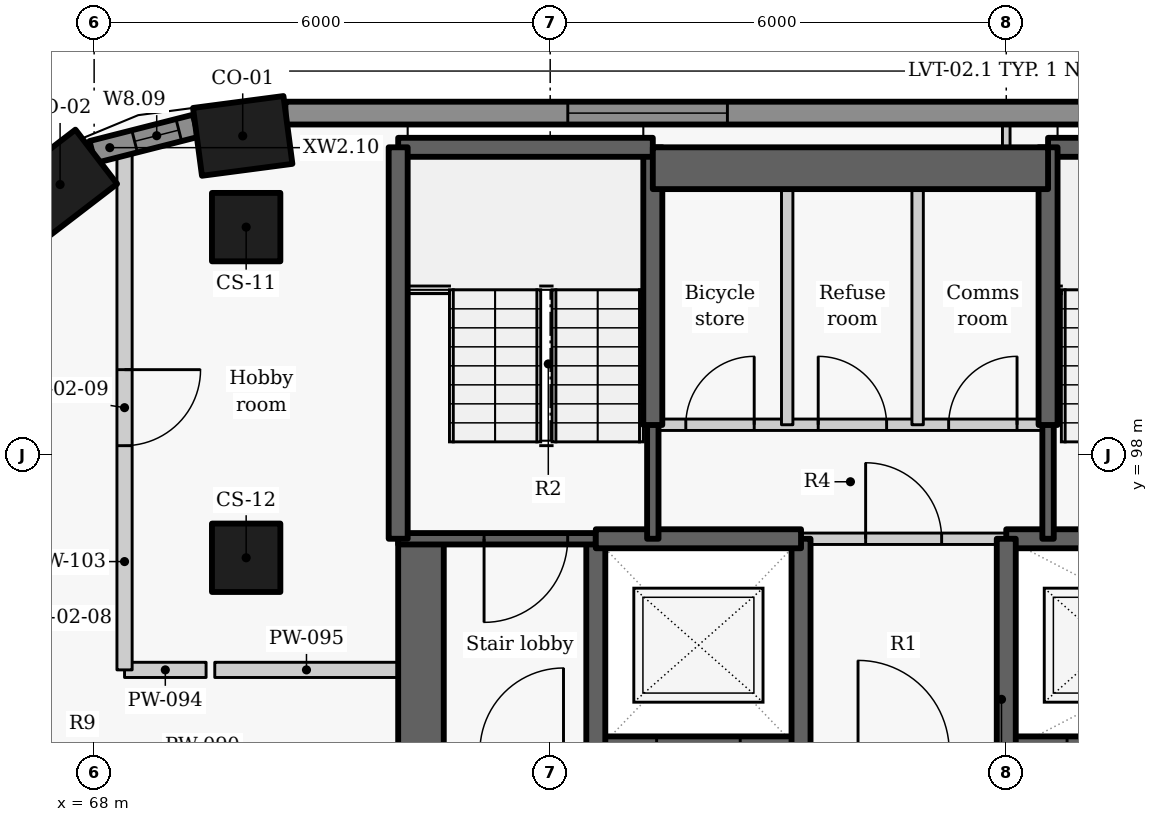
"""IFC4 building model, lengths in metres.
Left out: names, types, materials, properties, quantities, classifications, styles, units other than length and angle.
Written with IfcOpenShell. Run it as: python <this file> out.ifc"""

import sys

from ifc_helpers import new_model, si_unit, direction, frame, frame_2d, origin, origin_2d, place, context, subcontext, project, spatial, rectangle, extrude, element, fill, save


model = new_model("IFC4")
c1 = context("Model", 3, precision=1e-05, world=origin(), true_north=direction((0.0, 1.0)))
c2 = subcontext(c1, "Body", "Model", "MODEL_VIEW")
j1 = project(units=[si_unit("LENGTHUNIT", "METRE"), si_unit("PLANEANGLEUNIT", "RADIAN")], contexts=[c1])
p1 = place(None, origin())
s1 = spatial("IfcSite", under=j1, at=p1, CompositionType="ELEMENT")
p2 = place(p1, origin())
s2 = spatial("IfcBuilding", under=s1, at=p2, CompositionType="ELEMENT")
p3 = place(p2, frame((0.0, 0.0, 176.7)))
s3 = spatial("IfcBuildingStorey", under=s2, at=p3, CompositionType="ELEMENT", Elevation=176.7)
for number, where, z_axis, x_axis in (
    (1, (69.955, 102.2, 0.0), (0.0, 0.0, 1.0), (-0.991, -0.131, 0.0)),
    (2, (67.552, 101.56, 0.0), (0.0, 0.0, 1.0), (-0.793, -0.609, 0.0)),
):
    element("IfcColumn", number, at=place(p3, frame(where, z_axis=z_axis, x_axis=x_axis)), inside=s3, PredefinedType="COLUMN", context=c2, shape_type="SweptSolid", body=[
        extrude(rectangle(XDim=1.2, YDim=0.9, at=origin_2d()), origin(), (0.0, 0.0, 1.0), 3.3),
    ])
for number, where, z_axis, x_axis in (
    (3, (70.0, 101.0, 0.0), (0.0, 0.0, 1.0), (0.0, -1.0, 0.0)),
    (4, (70.0, 96.65, 0.0), (0.0, 0.0, 1.0), (0.0, -1.0, 0.0)),
):
    element("IfcColumn", number, at=place(p3, frame(where, z_axis=z_axis, x_axis=x_axis)), inside=s3, PredefinedType="COLUMN", context=c2, shape_type="SweptSolid", body=[
        extrude(rectangle(XDim=0.9, YDim=0.9, at=origin_2d()), origin(), (0.0, 0.0, 1.0), 3.3),
    ])
p4 = place(p3, frame((89.449, 102.5, 0.0), z_axis=(0.0, 0.0, 1.0), x_axis=(-1.0, 0.0, 0.0)))
e5 = element("IfcWall", 5, at=p4, inside=s3, PredefinedType="SOLIDWALL", context=c2, shape_type="SweptSolid", body=[
    extrude(rectangle(XDim=18.933, YDim=0.3, at=frame_2d((9.466, 0.0))), origin(), (0.0, 0.0, 1.0), 2.425),
])
p5 = place(p4, frame((3.687, 0.0, 0.9)))
e6 = element("IfcOpeningElement", 6, at=p5, cuts=e5, PredefinedType="OPENING", context=c2, shape_type="SweptSolid", body=[
    extrude(rectangle(XDim=2.1, YDim=1.1, at=frame_2d((1.05, 0.55))), frame((0.0, 0.16, 0.0), z_axis=(0.0, -1.0, 0.0), x_axis=(1.0, 0.0, 0.0)), (0.0, 0.0, 1.0), 0.32),
])
p6 = place(p4, frame((13.118, 0.0, 0.9)))
e7 = element("IfcOpeningElement", 7, at=p6, cuts=e5, PredefinedType="OPENING", context=c2, shape_type="SweptSolid", body=[
    extrude(rectangle(XDim=2.1, YDim=1.1, at=frame_2d((1.05, 0.55))), frame((0.0, 0.16, 0.0), z_axis=(0.0, -1.0, 0.0), x_axis=(1.0, 0.0, 0.0)), (0.0, 0.0, 1.0), 0.32),
])
p7 = place(p3, frame((69.336, 102.333, 0.0), z_axis=(0.0, 0.0, 1.0), x_axis=(-0.969037396898, -0.246914000036, 0.0)))
e8 = element("IfcWall", 8, at=p7, inside=s3, PredefinedType="SOLIDWALL", context=c2, shape_type="SweptSolid", body=[
    extrude(rectangle(XDim=1.403, YDim=0.3, at=frame_2d((0.702, 0.0))), origin(), (0.0, 0.0, 1.0), 2.425),
])
p8 = place(p7, frame((0.229, 0.0, 0.9)))
e9 = element("IfcOpeningElement", 9, at=p8, cuts=e8, PredefinedType="OPENING", context=c2, shape_type="SweptSolid", body=[
    extrude(rectangle(XDim=0.6, YDim=1.1, at=frame_2d((0.3, 0.55))), frame((0.0, 0.16, 0.0), z_axis=(0.0, -1.0, 0.0), x_axis=(1.0, 0.0, 0.0)), (0.0, 0.0, 1.0), 0.32),
])
p9 = place(p3, frame((72.3, 87.8, -0.41), z_axis=(0.0, 0.0, 1.0), x_axis=(0.0, 1.0, 0.0)))
e10 = element("IfcWall", 10, at=p9, inside=s3, PredefinedType="SHEAR", context=c2, shape_type="SweptSolid", body=[
    extrude(rectangle(XDim=9.1, YDim=0.6, at=frame_2d((4.55, 0.0))), origin(), (0.0, 0.0, 1.0), 3.435),
])
p10 = place(p9, frame((3.852, 0.0, 0.41)))
e11 = element("IfcOpeningElement", 11, at=p10, cuts=e10, PredefinedType="OPENING", context=c2, shape_type="SweptSolid", body=[
    extrude(rectangle(XDim=1.5, YDim=2.1, at=frame_2d((0.75, 1.05))), frame((0.0, 0.31, 0.0), z_axis=(0.0, -1.0, 0.0), x_axis=(1.0, 0.0, 0.0)), (0.0, 0.0, 1.0), 0.62),
])
p11 = place(p3, frame((74.597, 94.1, -0.41), z_axis=(0.0, 0.0, 1.0), x_axis=(1.0, 0.0, 0.0)))
e12 = element("IfcWall", 12, at=p11, inside=s3, PredefinedType="SHEAR", context=c2, shape_type="SweptSolid", body=[
    extrude(rectangle(XDim=2.706, YDim=0.4, at=frame_2d((1.353, 0.0))), origin(), (0.0, 0.0, 1.0), 3.435),
])
p12 = place(p11, frame((0.803, 0.0, 0.41)))
e13 = element("IfcOpeningElement", 13, at=p12, cuts=e12, PredefinedType="OPENING", context=c2, shape_type="SweptSolid", body=[
    extrude(rectangle(XDim=1.1, YDim=2.1, at=frame_2d((0.55, 1.05))), frame((0.0, 0.21, 0.0), z_axis=(0.0, -1.0, 0.0), x_axis=(1.0, 0.0, 0.0)), (0.0, 0.0, 1.0), 0.42),
])
p13 = place(p3, frame((79.997, 94.1, -0.41), z_axis=(0.0, 0.0, 1.0), x_axis=(1.0, 0.0, 0.0)))
e14 = element("IfcWall", 14, at=p13, inside=s3, PredefinedType="SHEAR", context=c2, shape_type="SweptSolid", body=[
    extrude(rectangle(XDim=5.406, YDim=0.4, at=frame_2d((2.703, 0.0))), origin(), (0.0, 0.0, 1.0), 3.435),
])
p14 = place(p13, frame((0.803, 0.0, 0.41)))
e15 = element("IfcOpeningElement", 15, at=p14, cuts=e14, PredefinedType="OPENING", context=c2, shape_type="SweptSolid", body=[
    extrude(rectangle(XDim=1.1, YDim=2.1, at=frame_2d((0.55, 1.05))), frame((0.0, 0.21, 0.0), z_axis=(0.0, -1.0, 0.0), x_axis=(1.0, 0.0, 0.0)), (0.0, 0.0, 1.0), 0.42),
])
p15 = place(p3, frame((74.6, 94.1, -0.41), z_axis=(0.0, 0.0, 1.0), x_axis=(0.0, 1.0, 0.0)))
e16 = element("IfcWall", 16, at=p15, inside=s3, PredefinedType="SHEAR", context=c2, shape_type="SweptSolid", body=[
    extrude(rectangle(XDim=2.8, YDim=0.25, at=frame_2d((1.4, 0.0))), origin(), (0.0, 0.0, 1.0), 3.435),
])
p16 = place(p3, frame((74.6, 96.9, -0.41), z_axis=(0.0, 0.0, 1.0), x_axis=(-1.0, 0.0, 0.0)))
e17 = element("IfcWall", 17, at=p16, inside=s3, PredefinedType="SHEAR", context=c2, shape_type="SweptSolid", body=[
    extrude(rectangle(XDim=2.6, YDim=0.15, at=frame_2d((1.3, 0.0))), origin(), (0.0, 0.0, 1.0), 3.435),
])
p17 = place(p16, frame((0.37, 0.0, 0.41)))
e18 = element("IfcOpeningElement", 18, at=p17, cuts=e17, PredefinedType="OPENING", context=c2, shape_type="SweptSolid", body=[
    extrude(rectangle(XDim=1.1, YDim=2.1, at=frame_2d((0.55, 1.05))), frame((0.0, 0.085, 0.0), z_axis=(0.0, -1.0, 0.0), x_axis=(1.0, 0.0, 0.0)), (0.0, 0.0, 1.0), 0.17),
])
p18 = place(p3, frame((77.3, 94.1, -0.41), z_axis=(0.0, 0.0, 1.0), x_axis=(0.0, 1.0, 0.0)))
e19 = element("IfcWall", 19, at=p18, inside=s3, PredefinedType="SHEAR", context=c2, shape_type="SweptSolid", body=[
    extrude(rectangle(XDim=2.8, YDim=0.25, at=frame_2d((1.4, 0.0))), origin(), (0.0, 0.0, 1.0), 3.435),
])
p19 = place(p3, frame((74.6, 96.9, -0.41), z_axis=(0.0, 0.0, 1.0), x_axis=(1.0, 0.0, 0.0)))
e20 = element("IfcWall", 20, at=p19, inside=s3, PredefinedType="SHEAR", context=c2, shape_type="SweptSolid", body=[
    extrude(rectangle(XDim=2.7, YDim=0.25, at=frame_2d((1.35, 0.0))), origin(), (0.0, 0.0, 1.0), 3.435),
])
p20 = place(p3, frame((80.0, 96.9, -0.41), z_axis=(0.0, 0.0, 1.0), x_axis=(1.0, 0.0, 0.0)))
e21 = element("IfcWall", 21, at=p20, inside=s3, PredefinedType="SHEAR", context=c2, shape_type="SweptSolid", body=[
    extrude(rectangle(XDim=8.0, YDim=0.25, at=frame_2d((4.0, 0.0))), origin(), (0.0, 0.0, 1.0), 3.435),
])
p21 = place(p20, frame((3.849, 0.0, 0.41)))
e22 = element("IfcOpeningElement", 22, at=p21, cuts=e21, PredefinedType="OPENING", context=c2, shape_type="SweptSolid", body=[
    extrude(rectangle(XDim=1.1, YDim=2.1, at=frame_2d((0.55, 1.05))), frame((0.0, 0.135, 0.0), z_axis=(0.0, -1.0, 0.0), x_axis=(1.0, 0.0, 0.0)), (0.0, 0.0, 1.0), 0.27),
])
p22 = place(p3, frame((80.0, 94.1, -0.41), z_axis=(0.0, 0.0, 1.0), x_axis=(0.0, 1.0, 0.0)))
e23 = element("IfcWall", 23, at=p22, inside=s3, PredefinedType="SHEAR", context=c2, shape_type="SweptSolid", body=[
    extrude(rectangle(XDim=2.8, YDim=0.25, at=frame_2d((1.4, 0.0))), origin(), (0.0, 0.0, 1.0), 3.435),
])
p23 = place(p3, frame((77.3, 96.9, 0.0), z_axis=(0.0, 0.0, 1.0), x_axis=(1.0, 0.0, 0.0)))
e24 = element("IfcWall", 24, at=p23, inside=s3, PredefinedType="PARTITIONING", context=c2, shape_type="SweptSolid", body=[
    extrude(rectangle(XDim=2.7, YDim=0.15, at=frame_2d((1.35, 0.0))), origin(), (0.0, 0.0, 1.0), 3.025),
])
p24 = place(p23, frame((0.85, 0.0, 0.0)))
e25 = element("IfcOpeningElement", 25, at=p24, cuts=e24, PredefinedType="OPENING", context=c2, shape_type="SweptSolid", body=[
    extrude(rectangle(XDim=1.0, YDim=2.1, at=frame_2d((0.5, 1.05))), frame((0.0, 0.085, 0.0), z_axis=(0.0, -1.0, 0.0), x_axis=(1.0, 0.0, 0.0)), (0.0, 0.0, 1.0), 0.17),
])
p25 = place(p3, frame((75.35, 96.9, -0.41), z_axis=(0.0, 0.0, 1.0), x_axis=(0.0, 1.0, 0.0)))
e26 = element("IfcWall", 26, at=p25, inside=s3, PredefinedType="SHEAR", context=c2, shape_type="SweptSolid", body=[
    extrude(rectangle(XDim=1.503, YDim=0.15, at=frame_2d((0.751, 0.0))), origin(), (0.0, 0.0, 1.0), 3.435),
])
p26 = place(p3, frame((75.35, 98.397, -0.41), z_axis=(0.0, 0.0, 1.0), x_axis=(0.0, 1.0, 0.0)))
e27 = element("IfcWall", 27, at=p26, inside=s3, PredefinedType="SHEAR", context=c2, shape_type="SweptSolid", body=[
    extrude(rectangle(XDim=3.653, YDim=0.25, at=frame_2d((1.827, 0.0))), origin(), (0.0, 0.0, 1.0), 3.435),
])
p27 = place(p3, frame((72.0, 102.05, 0.0), z_axis=(0.0, 0.0, 1.0), x_axis=(1.0, 0.0, 0.0)))
e28 = element("IfcWall", 28, at=p27, inside=s3, PredefinedType="SHEAR", context=c2, shape_type="SweptSolid", body=[
    extrude(rectangle(XDim=3.35, YDim=0.25, at=frame_2d((1.675, 0.0))), origin(), (0.0, 0.0, 1.0), 3.025),
])
p28 = place(p3, frame((80.55, 102.05, 0.0), z_axis=(0.0, 0.0, 1.0), x_axis=(1.0, 0.0, 0.0)))
e29 = element("IfcWall", 29, at=p28, inside=s3, PredefinedType="SHEAR", context=c2, shape_type="SweptSolid", body=[
    extrude(rectangle(XDim=2.85, YDim=0.25, at=frame_2d((1.425, 0.0))), origin(), (0.0, 0.0, 1.0), 3.025),
])
p29 = place(p3, frame((72.0, 96.9, -0.41), z_axis=(0.0, 0.0, 1.0), x_axis=(0.0, 1.0, 0.0)))
e30 = element("IfcWall", 30, at=p29, inside=s3, PredefinedType="SHEAR", context=c2, shape_type="SweptSolid", body=[
    extrude(rectangle(XDim=5.15, YDim=0.25, at=frame_2d((2.575, 0.0))), origin(), (0.0, 0.0, 1.0), 3.435),
])
p30 = place(p3, frame((80.55, 96.9, -0.41), z_axis=(0.0, 0.0, 1.0), x_axis=(0.0, 1.0, 0.0)))
e31 = element("IfcWall", 31, at=p30, inside=s3, PredefinedType="SHEAR", context=c2, shape_type="SweptSolid", body=[
    extrude(rectangle(XDim=1.503, YDim=0.15, at=frame_2d((0.751, 0.0))), origin(), (0.0, 0.0, 1.0), 3.435),
])
p31 = place(p3, frame((80.55, 98.397, -0.41), z_axis=(0.0, 0.0, 1.0), x_axis=(0.0, 1.0, 0.0)))
e32 = element("IfcWall", 32, at=p31, inside=s3, PredefinedType="SHEAR", context=c2, shape_type="SweptSolid", body=[
    extrude(rectangle(XDim=3.653, YDim=0.25, at=frame_2d((1.827, 0.0))), origin(), (0.0, 0.0, 1.0), 3.435),
])
p32 = place(p3, frame((75.35, 101.775, 0.0), z_axis=(0.0, 0.0, 1.0), x_axis=(1.0, 0.0, 0.0)))
e33 = element("IfcWall", 33, at=p32, inside=s3, PredefinedType="SHEAR", context=c2, shape_type="SweptSolid", body=[
    extrude(rectangle(XDim=5.2, YDim=0.55, at=frame_2d((2.6, 0.0))), origin(), (0.0, 0.0, 1.0), 3.025),
])
p33 = place(p3, frame((75.35, 98.4, 0.0), z_axis=(0.0, 0.0, 1.0), x_axis=(1.0, 0.0, 0.0)))
e34 = element("IfcWall", 34, at=p33, inside=s3, PredefinedType="PARTITIONING", context=c2, shape_type="SweptSolid", body=[
    extrude(rectangle(XDim=5.2, YDim=0.15, at=frame_2d((2.6, 0.0))), origin(), (0.0, 0.0, 1.0), 3.025),
])
p34 = place(p33, frame((0.434, 0.0, 0.0)))
e35 = element("IfcOpeningElement", 35, at=p34, cuts=e34, PredefinedType="OPENING", context=c2, shape_type="SweptSolid", body=[
    extrude(rectangle(XDim=0.9, YDim=2.1, at=frame_2d((0.45, 1.05))), frame((0.0, 0.085, 0.0), z_axis=(0.0, -1.0, 0.0), x_axis=(1.0, 0.0, 0.0)), (0.0, 0.0, 1.0), 0.17),
])
p35 = place(p33, frame((2.176, 0.0, 0.0)))
e36 = element("IfcOpeningElement", 36, at=p35, cuts=e34, PredefinedType="OPENING", context=c2, shape_type="SweptSolid", body=[
    extrude(rectangle(XDim=0.9, YDim=2.1, at=frame_2d((0.45, 1.05))), frame((0.0, 0.085, 0.0), z_axis=(0.0, -1.0, 0.0), x_axis=(1.0, 0.0, 0.0)), (0.0, 0.0, 1.0), 0.17),
])
p36 = place(p33, frame((3.892, 0.0, 0.0)))
e37 = element("IfcOpeningElement", 37, at=p36, cuts=e34, PredefinedType="OPENING", context=c2, shape_type="SweptSolid", body=[
    extrude(rectangle(XDim=0.9, YDim=2.1, at=frame_2d((0.45, 1.05))), frame((0.0, 0.085, 0.0), z_axis=(0.0, -1.0, 0.0), x_axis=(1.0, 0.0, 0.0)), (0.0, 0.0, 1.0), 0.17),
])
for number, where, z_axis, x_axis in (
    (38, (77.118, 98.4, 0.0), (0.0, 0.0, 1.0), (0.0, 1.0, 0.0)),
    (39, (78.834, 98.4, 0.0), (0.0, 0.0, 1.0), (0.0, 1.0, 0.0)),
):
    element("IfcWall", number, at=place(p3, frame(where, z_axis=z_axis, x_axis=x_axis)), inside=s3, PredefinedType="PARTITIONING", context=c2, shape_type="SweptSolid", body=[
        extrude(rectangle(XDim=3.65, YDim=0.15, at=frame_2d((1.825, 0.0))), origin(), (0.0, 0.0, 1.0), 3.025),
    ])
p37 = place(p3, frame((68.4, 95.175, 0.0), z_axis=(0.0, 0.0, 1.0), x_axis=(1.0, 0.0, 0.0)))
e40 = element("IfcWall", 40, at=p37, inside=s3, PredefinedType="PARTITIONING", context=c2, shape_type="SweptSolid", body=[
    extrude(rectangle(XDim=1.073, YDim=0.2, at=frame_2d((0.537, 0.0))), origin(), (0.0, 0.0, 1.0), 3.025),
])
p38 = place(p3, frame((69.587, 95.175, 0.0), z_axis=(0.0, 0.0, 1.0), x_axis=(1.0, 0.0, 0.0)))
e41 = element("IfcWall", 41, at=p38, inside=s3, PredefinedType="PARTITIONING", context=c2, shape_type="SweptSolid", body=[
    extrude(rectangle(XDim=2.413, YDim=0.2, at=frame_2d((1.207, 0.0))), origin(), (0.0, 0.0, 1.0), 2.505),
])
p39 = place(p3, frame((68.4, 102.074, 0.0), z_axis=(0.0, 0.0, 1.0), x_axis=(0.0, -1.0, 0.0)))
e42 = element("IfcWall", 42, at=p39, inside=s3, PredefinedType="PARTITIONING", context=c2, shape_type="SweptSolid", body=[
    extrude(rectangle(XDim=6.899, YDim=0.2, at=frame_2d((3.449, 0.0))), origin(), (0.0, 0.0, 1.0), 2.405),
])
p40 = place(p39, frame((2.949, 0.0, 0.0)))
e43 = element("IfcOpeningElement", 43, at=p40, cuts=e42, PredefinedType="OPENING", context=c2, shape_type="SweptSolid", body=[
    extrude(rectangle(XDim=1.0, YDim=2.1, at=frame_2d((0.5, 1.05))), frame((0.0, 0.11, 0.0), z_axis=(0.0, -1.0, 0.0), x_axis=(1.0, 0.0, 0.0)), (0.0, 0.0, 1.0), 0.22),
])
p41 = place(p3, frame((80.0, 102.05, 0.0), z_axis=(0.0, 0.0, 1.0), x_axis=(0.0, 1.0, 0.0)))
e44 = element("IfcWall", 44, at=p41, inside=s3, PredefinedType="PARTITIONING", context=c2, shape_type="SweptSolid", body=[
    extrude(rectangle(XDim=0.3, YDim=0.1, at=frame_2d((0.15, 0.0))), origin(), (0.0, 0.0, 1.0), 3.025),
])
p42 = place(p6, origin())
e45 = element("IfcWindow", 45, at=p42, inside=s3, PartitioningType="SINGLE_PANEL", PredefinedType="WINDOW", context=c2, shape_type="SweptSolid", body=[
    extrude(rectangle(XDim=2.1, YDim=1.1, at=frame_2d((1.05, 0.55))), frame((0.0, 0.03, 0.0), z_axis=(0.0, -1.0, 0.0), x_axis=(1.0, 0.0, 0.0)), (0.0, 0.0, 1.0), 0.06),
])
fill(e7, e45)
p43 = place(p8, origin())
e46 = element("IfcWindow", 46, at=p43, inside=s3, PartitioningType="SINGLE_PANEL", PredefinedType="WINDOW", context=c2, shape_type="SweptSolid", body=[
    extrude(rectangle(XDim=0.6, YDim=1.1, at=frame_2d((0.3, 0.55))), frame((0.0, 0.03, 0.0), z_axis=(0.0, -1.0, 0.0), x_axis=(1.0, 0.0, 0.0)), (0.0, 0.0, 1.0), 0.06),
])
fill(e9, e46)
p44 = place(p24, origin())
e47 = element("IfcDoor", 47, at=p44, inside=s3, OperationType="SINGLE_SWING_LEFT", PredefinedType="DOOR", context=c2, shape_type="SweptSolid", body=[
    extrude(rectangle(XDim=1.0, YDim=2.1, at=frame_2d((0.5, 1.05))), frame((0.0, 0.025, 0.0), z_axis=(0.0, -1.0, 0.0), x_axis=(1.0, 0.0, 0.0)), (0.0, 0.0, 1.0), 0.05),
])
fill(e25, e47)
p45 = place(p34, origin())
e48 = element("IfcDoor", 48, at=p45, inside=s3, OperationType="SINGLE_SWING_RIGHT", PredefinedType="DOOR", context=c2, shape_type="SweptSolid", body=[
    extrude(rectangle(XDim=0.9, YDim=2.1, at=frame_2d((0.45, 1.05))), frame((0.0, 0.025, 0.0), z_axis=(0.0, -1.0, 0.0), x_axis=(1.0, 0.0, 0.0)), (0.0, 0.0, 1.0), 0.05),
])
fill(e35, e48)
p46 = place(p35, origin())
e49 = element("IfcDoor", 49, at=p46, inside=s3, OperationType="SINGLE_SWING_LEFT", PredefinedType="DOOR", context=c2, shape_type="SweptSolid", body=[
    extrude(rectangle(XDim=0.9, YDim=2.1, at=frame_2d((0.45, 1.05))), frame((0.0, 0.025, 0.0), z_axis=(0.0, -1.0, 0.0), x_axis=(1.0, 0.0, 0.0)), (0.0, 0.0, 1.0), 0.05),
])
fill(e36, e49)
p47 = place(p36, origin())
e50 = element("IfcDoor", 50, at=p47, inside=s3, OperationType="SINGLE_SWING_RIGHT", PredefinedType="DOOR", context=c2, shape_type="SweptSolid", body=[
    extrude(rectangle(XDim=0.9, YDim=2.1, at=frame_2d((0.45, 1.05))), frame((0.0, 0.025, 0.0), z_axis=(0.0, -1.0, 0.0), x_axis=(1.0, 0.0, 0.0)), (0.0, 0.0, 1.0), 0.05),
])
fill(e37, e50)
p48 = place(p17, origin())
e51 = element("IfcDoor", 51, at=p48, inside=s3, OperationType="SINGLE_SWING_RIGHT", PredefinedType="DOOR", context=c2, shape_type="SweptSolid", body=[
    extrude(rectangle(XDim=1.1, YDim=2.1, at=frame_2d((0.55, 1.05))), frame((0.0, 0.025, 0.0), z_axis=(0.0, -1.0, 0.0), x_axis=(1.0, 0.0, 0.0)), (0.0, 0.0, 1.0), 0.05),
])
fill(e18, e51)
p49 = place(p40, origin())
e52 = element("IfcDoor", 52, at=p49, inside=s3, OperationType="SINGLE_SWING_LEFT", PredefinedType="DOOR", context=c2, shape_type="SweptSolid", body=[
    extrude(rectangle(XDim=1.0, YDim=2.1, at=frame_2d((0.5, 1.05))), frame((0.0, 0.025, 0.0), z_axis=(0.0, -1.0, 0.0), x_axis=(1.0, 0.0, 0.0)), (0.0, 0.0, 1.0), 0.05),
])
fill(e43, e52)
save(model, sys.argv[1])
